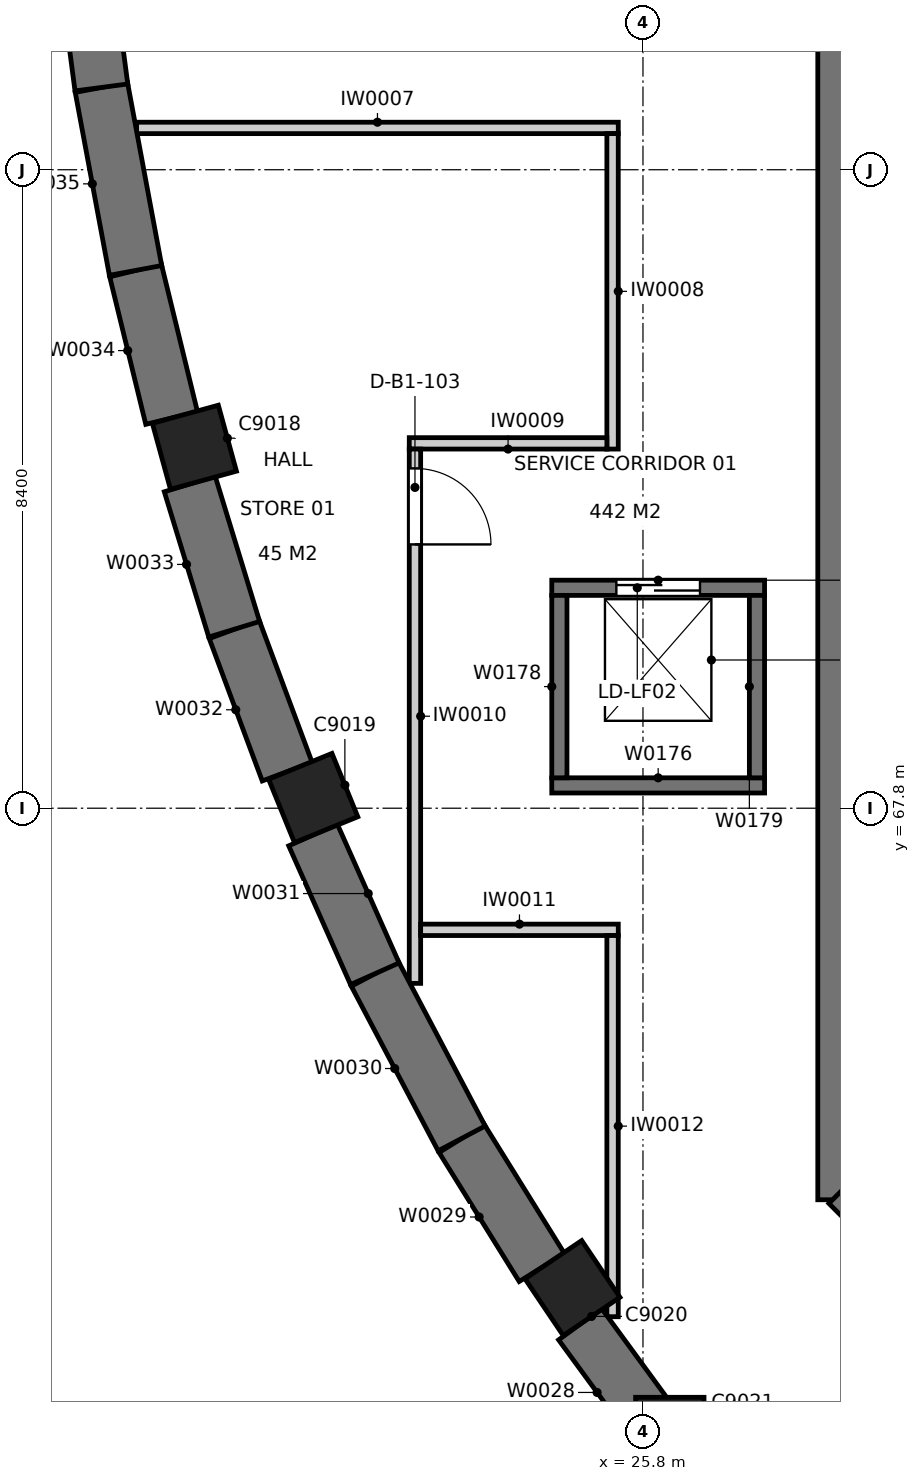
"""IFC4 building model, lengths in metres.
Left out: names, types, materials, properties, quantities, classifications, styles, units other than length and angle.
Written with IfcOpenShell. Run it as: python <this file> out.ifc"""

import sys

from ifc_helpers import new_model, si_unit, direction, frame, frame_2d, origin, origin_2d, place, context, subcontext, project, spatial, rectangle, extrude, element, fill, save


model = new_model("IFC4")
c1 = context("Model", 3, precision=1e-05, world=origin(), true_north=direction((0.0, 1.0)))
c2 = subcontext(c1, "Body", "Model", "MODEL_VIEW")
j1 = project(units=[si_unit("LENGTHUNIT", "METRE"), si_unit("PLANEANGLEUNIT", "RADIAN")], contexts=[c1])
p1 = place(None, origin())
s1 = spatial("IfcSite", under=j1, at=p1, CompositionType="ELEMENT")
p2 = place(p1, origin())
s2 = spatial("IfcBuilding", under=s1, at=p2, CompositionType="ELEMENT")
p3 = place(p2, frame((0.0, 0.0, -5.0)))
s3 = spatial("IfcBuildingStorey", under=s2, at=p3, CompositionType="ELEMENT", Elevation=-5.0)
for number, where, z_axis, x_axis in (
    (1, (19.898, 72.549, -0.5), (0.0, 0.0, 1.0), (0.964, 0.265, 0.0)),
    (2, (21.461, 67.934, -0.5), (0.0, 0.0, 1.0), (0.926, 0.377, 0.0)),
    (3, (24.872, 61.487, -0.5), (0.0, 0.0, 1.0), (0.829, 0.559, 0.0)),
    (4, (26.153, 59.6, -0.5), (0.0, 0.0, 1.0), (1.0, 0.0, 0.0)),
):
    element("IfcColumn", number, at=place(p3, frame(where, z_axis=z_axis, x_axis=x_axis)), inside=s3, PredefinedType="COLUMN", context=c2, shape_type="SweptSolid", body=[
        extrude(rectangle(XDim=0.9, YDim=0.9, at=origin_2d()), origin(), (0.0, 0.0, 1.0), 5.5),
    ])
p4 = place(p3, frame((28.35, 100.8, 0.0), z_axis=(0.0, 0.0, 1.0), x_axis=(0.0, -1.0, 0.0)))
e5 = element("IfcWall", 5, at=p4, inside=s3, PredefinedType="SOLIDWALL", context=c2, shape_type="SweptSolid", body=[
    extrude(rectangle(XDim=38.151, YDim=0.5, at=frame_2d((19.076, 0.0))), origin(), (0.0, 0.0, 1.0), 5.0),
])
p5 = place(p3, frame((28.423, 62.777, 0.0), z_axis=(0.0, 0.0, 1.0), x_axis=(0.707106781187, -0.707106781187, 0.0)))
e6 = element("IfcWall", 6, at=p5, inside=s3, PredefinedType="SOLIDWALL", context=c2, shape_type="SweptSolid", body=[
    extrude(rectangle(XDim=4.32, YDim=0.5, at=frame_2d((2.16, 0.0))), origin(), (0.0, 0.0, 1.0), 5.0),
])
p6 = place(p3, frame((25.985, 59.629, 0.0), z_axis=(0.0, 0.0, 1.0), x_axis=(-0.590709049895, 0.806884637586, 0.0)))
e7 = element("IfcWall", 7, at=p6, inside=s3, PredefinedType="SOLIDWALL", context=c2, shape_type="SweptSolid", body=[
    extrude(rectangle(XDim=1.714, YDim=0.7, at=frame_2d((0.857, 0.0))), origin(), (0.0, 0.0, 1.0), 5.0),
])
p7 = place(p3, frame((24.469, 61.758, 0.0), z_axis=(0.0, 0.0, 1.0), x_axis=(-0.52780073797, 0.849368224622, 0.0)))
e8 = element("IfcWall", 8, at=p7, inside=s3, PredefinedType="SOLIDWALL", context=c2, shape_type="SweptSolid", body=[
    extrude(rectangle(XDim=1.998, YDim=0.7, at=frame_2d((0.999, 0.0))), origin(), (0.0, 0.0, 1.0), 5.0),
])
p8 = place(p3, frame((23.414, 63.456, 0.0), z_axis=(0.0, 0.0, 1.0), x_axis=(-0.466531148386, 0.88450476968, 0.0)))
e9 = element("IfcWall", 9, at=p8, inside=s3, PredefinedType="SOLIDWALL", context=c2, shape_type="SweptSolid", body=[
    extrude(rectangle(XDim=2.448, YDim=0.7, at=frame_2d((1.224, 0.0))), origin(), (0.0, 0.0, 1.0), 5.0),
])
p9 = place(p3, frame((22.272, 65.622, 0.0), z_axis=(0.0, 0.0, 1.0), x_axis=(-0.406841164328, 0.913498914618, 0.0)))
e10 = element("IfcWall", 10, at=p9, inside=s3, PredefinedType="SOLIDWALL", context=c2, shape_type="SweptSolid", body=[
    extrude(rectangle(XDim=1.998, YDim=0.7, at=frame_2d((0.999, 0.0))), origin(), (0.0, 0.0, 1.0), 5.0),
])
for number, where, z_axis, x_axis in (
    (11, (21.119, 68.281, 0.0), (0.0, 0.0, 1.0), (-0.349, 0.937, 0.0)),
    (12, (20.422, 70.154, 0.0), (0.0, 0.0, 1.0), (-0.293, 0.956, 0.0)),
    (13, (19.598, 72.933, 0.0), (0.0, 0.0, 1.0), (-0.237, 0.971, 0.0)),
):
    element("IfcWall", number, at=place(p3, frame(where, z_axis=z_axis, x_axis=x_axis)), inside=s3, PredefinedType="SOLIDWALL", context=c2, shape_type="SweptSolid", body=[
        extrude(rectangle(XDim=1.999, YDim=0.7, at=frame_2d((0.999, 0.0))), origin(), (0.0, 0.0, 1.0), 5.0),
    ])
p10 = place(p3, frame((19.124, 74.875, 0.0), z_axis=(0.0, 0.0, 1.0), x_axis=(-0.183560061047, 0.983008496397, 0.0)))
e14 = element("IfcWall", 14, at=p10, inside=s3, PredefinedType="SOLIDWALL", context=c2, shape_type="SweptSolid", body=[
    extrude(rectangle(XDim=2.448, YDim=0.7, at=frame_2d((1.224, 0.0))), origin(), (0.0, 0.0, 1.0), 5.0),
])
p11 = place(p3, frame((18.674, 77.282, 0.0), z_axis=(0.0, 0.0, 1.0), x_axis=(-0.130467152696, 0.991452632286, 0.0)))
e15 = element("IfcWall", 15, at=p11, inside=s3, PredefinedType="SOLIDWALL", context=c2, shape_type="SweptSolid", body=[
    extrude(rectangle(XDim=1.999, YDim=0.7, at=frame_2d((0.999, 0.0))), origin(), (0.0, 0.0, 1.0), 5.0),
])
p12 = place(p3, frame((24.6, 68.1, -1.4), z_axis=(0.0, 0.0, 1.0), x_axis=(1.0, 0.0, 0.0)))
e16 = element("IfcWall", 16, at=p12, inside=s3, PredefinedType="SOLIDWALL", context=c2, shape_type="SweptSolid", body=[
    extrude(rectangle(XDim=2.8, YDim=0.2, at=frame_2d((1.4, 0.0))), origin(), (0.0, 0.0, 1.0), 6.4),
])
p13 = place(p3, frame((24.6, 70.7, -1.4), z_axis=(0.0, 0.0, 1.0), x_axis=(1.0, 0.0, 0.0)))
e17 = element("IfcWall", 17, at=p13, inside=s3, PredefinedType="SOLIDWALL", context=c2, shape_type="SweptSolid", body=[
    extrude(rectangle(XDim=2.8, YDim=0.2, at=frame_2d((1.4, 0.0))), origin(), (0.0, 0.0, 1.0), 6.4),
])
p14 = place(p13, frame((0.85, 0.0, 1.4)))
e18 = element("IfcOpeningElement", 18, at=p14, cuts=e17, PredefinedType="OPENING", context=c2, shape_type="SweptSolid", body=[
    extrude(rectangle(XDim=1.1, YDim=2.1, at=frame_2d((0.55, 1.05))), frame((0.0, 0.11, 0.0), z_axis=(0.0, -1.0, 0.0), x_axis=(1.0, 0.0, 0.0)), (0.0, 0.0, 1.0), 0.22),
])
for number, where, z_axis, x_axis in (
    (19, (24.7, 68.2, -1.4), (0.0, 0.0, 1.0), (0.0, 1.0, 0.0)),
    (20, (27.3, 68.2, -1.4), (0.0, 0.0, 1.0), (0.0, 1.0, 0.0)),
):
    element("IfcWall", number, at=place(p3, frame(where, z_axis=z_axis, x_axis=x_axis)), inside=s3, PredefinedType="SOLIDWALL", context=c2, shape_type="SweptSolid", body=[
        extrude(rectangle(XDim=2.4, YDim=0.2, at=frame_2d((1.2, 0.0))), origin(), (0.0, 0.0, 1.0), 6.4),
    ])
p15 = place(p3, frame((19.138, 76.75, 0.0), z_axis=(0.0, 0.0, 1.0), x_axis=(1.0, 0.0, 0.0)))
e21 = element("IfcWall", 21, at=p15, inside=s3, PredefinedType="PARTITIONING", context=c2, shape_type="SweptSolid", body=[
    extrude(rectangle(XDim=6.337, YDim=0.15, at=frame_2d((3.168, 0.0))), origin(), (0.0, 0.0, 1.0), 4.75),
])
p16 = place(p3, frame((25.4, 76.675, 0.0), z_axis=(0.0, 0.0, 1.0), x_axis=(0.0, -1.0, 0.0)))
e22 = element("IfcWall", 22, at=p16, inside=s3, PredefinedType="PARTITIONING", context=c2, shape_type="SweptSolid", body=[
    extrude(rectangle(XDim=4.15, YDim=0.15, at=frame_2d((2.075, 0.0))), origin(), (0.0, 0.0, 1.0), 3.8),
])
p17 = place(p3, frame((25.325, 72.6, 0.0), z_axis=(0.0, 0.0, 1.0), x_axis=(-1.0, 0.0, 0.0)))
e23 = element("IfcWall", 23, at=p17, inside=s3, PredefinedType="PARTITIONING", context=c2, shape_type="SweptSolid", body=[
    extrude(rectangle(XDim=2.6, YDim=0.15, at=frame_2d((1.3, 0.0))), origin(), (0.0, 0.0, 1.0), 4.75),
])
p18 = place(p3, frame((22.8, 72.525, 0.0), z_axis=(0.0, 0.0, 1.0), x_axis=(0.0, -1.0, 0.0)))
e24 = element("IfcWall", 24, at=p18, inside=s3, PredefinedType="PARTITIONING", context=c2, shape_type="SweptSolid", body=[
    extrude(rectangle(XDim=7.029, YDim=0.15, at=frame_2d((3.515, 0.0))), origin(), (0.0, 0.0, 1.0), 3.8),
])
p19 = place(p18, frame((0.254, 0.0, 0.0)))
e25 = element("IfcOpeningElement", 25, at=p19, cuts=e24, PredefinedType="OPENING", context=c2, shape_type="SweptSolid", body=[
    extrude(rectangle(XDim=1.0, YDim=2.1, at=frame_2d((0.5, 1.05))), frame((0.0, 0.085, 0.0), z_axis=(0.0, -1.0, 0.0), x_axis=(1.0, 0.0, 0.0)), (0.0, 0.0, 1.0), 0.17),
])
p20 = place(p3, frame((22.875, 66.2, 0.0), z_axis=(0.0, 0.0, 1.0), x_axis=(1.0, 0.0, 0.0)))
e26 = element("IfcWall", 26, at=p20, inside=s3, PredefinedType="PARTITIONING", context=c2, shape_type="SweptSolid", body=[
    extrude(rectangle(XDim=2.6, YDim=0.15, at=frame_2d((1.3, 0.0))), origin(), (0.0, 0.0, 1.0), 4.75),
])
p21 = place(p3, frame((25.4, 66.125, 0.0), z_axis=(0.0, 0.0, 1.0), x_axis=(0.0, -1.0, 0.0)))
e27 = element("IfcWall", 27, at=p21, inside=s3, PredefinedType="PARTITIONING", context=c2, shape_type="SweptSolid", body=[
    extrude(rectangle(XDim=5.015, YDim=0.15, at=frame_2d((2.507, 0.0))), origin(), (0.0, 0.0, 1.0), 4.1),
])
p22 = place(p19, origin())
e28 = element("IfcDoor", 28, at=p22, inside=s3, OperationType="SINGLE_SWING_RIGHT", PredefinedType="DOOR", context=c2, shape_type="SweptSolid", body=[
    extrude(rectangle(XDim=1.0, YDim=2.1, at=frame_2d((0.5, 1.05))), frame((0.0, 0.025, 0.0), z_axis=(0.0, -1.0, 0.0), x_axis=(1.0, 0.0, 0.0)), (0.0, 0.0, 1.0), 0.05),
])
fill(e25, e28)
p23 = place(p14, origin())
e29 = element("IfcDoor", 29, at=p23, inside=s3, OperationType="SLIDING_TO_LEFT", PredefinedType="DOOR", context=c2, shape_type="SweptSolid", body=[
    extrude(rectangle(XDim=1.1, YDim=2.1, at=frame_2d((0.55, 1.05))), frame((0.0, 0.025, 0.0), z_axis=(0.0, -1.0, 0.0), x_axis=(1.0, 0.0, 0.0)), (0.0, 0.0, 1.0), 0.05),
])
fill(e18, e29)
save(model, sys.argv[1])
